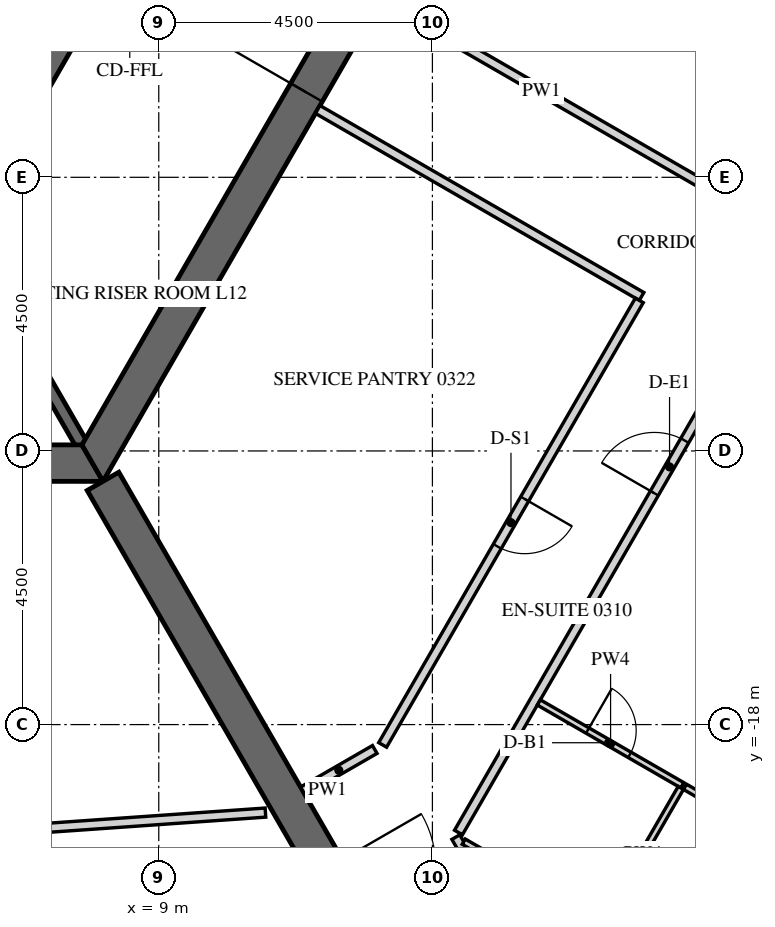
"""IFC4 building model, lengths in metres.
Left out: names, types, materials, properties, quantities, classifications, styles, units other than length and angle.
Written with IfcOpenShell. Run it as: python <this file> out.ifc"""

import sys

from ifc_helpers import new_model, si_unit, direction, frame, frame_2d, origin, place, context, subcontext, project, spatial, polyline, rectangle, outline, extrude, element, fill, save


model = new_model("IFC4")
c1 = context("Model", 3, precision=1e-05, world=origin(), true_north=direction((0.0, 1.0)))
c2 = subcontext(c1, "Body", "Model", "MODEL_VIEW")
j1 = project(units=[si_unit("LENGTHUNIT", "METRE"), si_unit("PLANEANGLEUNIT", "RADIAN")], contexts=[c1])
p1 = place(None, origin())
s1 = spatial("IfcSite", under=j1, at=p1, CompositionType="ELEMENT")
p2 = place(p1, origin())
s2 = spatial("IfcBuilding", under=s1, at=p2, CompositionType="ELEMENT")
p3 = place(p2, frame((0.0, 0.0, 60.9)))
s3 = spatial("IfcBuildingStorey", under=s2, at=p3, CompositionType="ELEMENT", Elevation=60.9)
p4 = place(p3, frame((-7.91, -13.7, -0.15), z_axis=(0.0, 0.0, 1.0), x_axis=(1.0, 0.0, 0.0)))
e1 = element("IfcWall", 1, at=p4, inside=s3, PredefinedType="SHEAR", context=c2, shape_type="SweptSolid", body=[
    extrude(outline(polyline([(-0.173, -0.3), (15.993, -0.3), (15.646, 0.3), (0.173, 0.3), (-0.173, -0.3)])), origin(), (0.0, 0.0, 1.0), 3.9),
])
p5 = place(p4, frame((7.31, 0.0, 0.15)))
e2 = element("IfcOpeningElement", 2, at=p5, cuts=e1, PredefinedType="OPENING", context=c2, shape_type="SweptSolid", body=[
    extrude(rectangle(XDim=1.2, YDim=2.4, at=frame_2d((0.6, 1.2))), frame((0.0, 0.31, 0.0), z_axis=(0.0, -1.0, 0.0), x_axis=(1.0, 0.0, 0.0)), (0.0, 0.0, 1.0), 0.62),
])
p6 = place(p3, frame((7.91, -13.7, -0.15), z_axis=(0.0, 0.0, 1.0), x_axis=(0.499999880136, 0.866025472988, 0.0)))
e3 = element("IfcWall", 3, at=p6, inside=s3, PredefinedType="SHEAR", context=c2, shape_type="SweptSolid", body=[
    extrude(outline(polyline([(-0.173, -0.3), (15.993, -0.3), (15.646, 0.3), (0.173, 0.3), (-0.173, -0.3)])), origin(), (0.0, 0.0, 1.0), 3.9),
])
p7 = place(p6, frame((7.039, 0.0, 0.15)))
e4 = element("IfcOpeningElement", 4, at=p7, cuts=e3, PredefinedType="OPENING", context=c2, shape_type="SweptSolid", body=[
    extrude(rectangle(XDim=1.8, YDim=2.4, at=frame_2d((0.9, 1.2))), frame((0.0, 0.31, 0.0), z_axis=(0.0, -1.0, 0.0), x_axis=(1.0, 0.0, 0.0)), (0.0, 0.0, 1.0), 0.62),
])
p8 = place(p3, frame((8.083, -14.0, -0.15), z_axis=(0.0, 0.0, 1.0), x_axis=(0.499997680643, -0.866026742862, 0.0)))
e5 = element("IfcWall", 5, at=p8, inside=s3, PredefinedType="SHEAR", context=c2, shape_type="SweptSolid", body=[
    extrude(rectangle(XDim=16.509, YDim=0.6, at=frame_2d((8.254, 0.0))), origin(), (0.0, 0.0, 1.0), 3.9),
])
p9 = place(p8, frame((7.354, 0.0, 0.15)))
e6 = element("IfcOpeningElement", 6, at=p9, cuts=e5, PredefinedType="OPENING", context=c2, shape_type="SweptSolid", body=[
    extrude(rectangle(XDim=1.8, YDim=2.4, at=frame_2d((0.9, 1.2))), frame((0.0, 0.31, 0.0), z_axis=(0.0, -1.0, 0.0), x_axis=(1.0, 0.0, 0.0)), (0.0, 0.0, 1.0), 0.62),
])
p10 = place(p3, frame((5.673, -9.825, -0.15), z_axis=(0.0, 0.0, 1.0), x_axis=(0.499995046907, 0.866028263435, 0.0)))
e7 = element("IfcWall", 7, at=p10, inside=s3, PredefinedType="SHEAR", context=c2, shape_type="SweptSolid", body=[
    extrude(outline(polyline([(-0.101, -0.175), (11.446, -0.175), (11.244, 0.175), (0.101, 0.175), (-0.101, -0.175)])), origin(), (0.0, 0.0, 1.0), 3.9),
])
p11 = place(p10, frame((4.801, 0.0, 0.15)))
e8 = element("IfcOpeningElement", 8, at=p11, cuts=e7, PredefinedType="OPENING", context=c2, shape_type="SweptSolid", body=[
    extrude(rectangle(XDim=1.8, YDim=2.4, at=frame_2d((0.9, 1.2))), frame((0.0, 0.185, 0.0), z_axis=(0.0, -1.0, 0.0), x_axis=(1.0, 0.0, 0.0)), (0.0, 0.0, 1.0), 0.37),
])
p12 = place(p3, frame((5.773, -10.0, -0.15), z_axis=(0.0, 0.0, 1.0), x_axis=(0.500038251005, -0.86600331843, 0.0)))
e9 = element("IfcWall", 9, at=p12, inside=s3, PredefinedType="SHEAR", context=c2, shape_type="SweptSolid", body=[
    extrude(rectangle(XDim=3.926, YDim=0.2, at=frame_2d((1.963, 0.0))), origin(), (0.0, 0.0, 1.0), 3.9),
])
p13 = place(p3, frame((10.754, -19.447, 0.0), z_axis=(0.0, 0.0, 1.0), x_axis=(-0.997564830966, -0.069745308232, 0.0)))
e10 = element("IfcWall", 10, at=p13, inside=s3, PredefinedType="PARTITIONING", context=c2, shape_type="SweptSolid", body=[
    extrude(rectangle(XDim=10.029, YDim=0.15, at=frame_2d((5.014, 0.0))), origin(), (0.0, 0.0, 1.0), 2.988),
])
p14 = place(p13, frame((4.564, 0.0, 0.0)))
e11 = element("IfcOpeningElement", 11, at=p14, cuts=e10, PredefinedType="OPENING", context=c2, shape_type="SweptSolid", body=[
    extrude(rectangle(XDim=0.9, YDim=2.1, at=frame_2d((0.45, 1.05))), frame((0.0, 0.085, 0.0), z_axis=(0.0, -1.0, 0.0), x_axis=(1.0, 0.0, 0.0)), (0.0, 0.0, 1.0), 0.17),
])
p15 = place(p3, frame((15.441, -22.545, 0.0), z_axis=(0.0, 0.0, 1.0), x_axis=(-0.500037089193, 0.86600398927, 0.0)))
e12 = element("IfcWall", 12, at=p15, inside=s3, PredefinedType="PARTITIONING", context=c2, shape_type="SweptSolid", body=[
    extrude(rectangle(XDim=3.112, YDim=0.15, at=frame_2d((1.556, 0.0))), origin(), (0.0, 0.0, 1.0), 2.988),
])
p16 = place(p3, frame((13.928, -19.775, 0.0), z_axis=(0.0, 0.0, 1.0), x_axis=(0.50000450071, 0.866022805283, 0.0)))
e13 = element("IfcWall", 13, at=p16, inside=s3, PredefinedType="PARTITIONING", context=c2, shape_type="SweptSolid", body=[
    extrude(rectangle(XDim=23.877, YDim=0.15, at=frame_2d((11.938, 0.0))), origin(), (0.0, 0.0, 1.0), 2.988),
])
p17 = place(p16, frame((6.443, 0.0, 0.0)))
e14 = element("IfcOpeningElement", 14, at=p17, cuts=e13, PredefinedType="OPENING", context=c2, shape_type="SweptSolid", body=[
    extrude(rectangle(XDim=1.0, YDim=2.1, at=frame_2d((0.5, 1.05))), frame((0.0, 0.085, 0.0), z_axis=(0.0, -1.0, 0.0), x_axis=(1.0, 0.0, 0.0)), (0.0, 0.0, 1.0), 0.17),
])
p18 = place(p16, frame((14.972, 0.0, 0.0)))
e15 = element("IfcOpeningElement", 15, at=p18, cuts=e13, PredefinedType="OPENING", context=c2, shape_type="SweptSolid", body=[
    extrude(rectangle(XDim=1.0, YDim=2.1, at=frame_2d((0.5, 1.05))), frame((0.0, 0.085, 0.0), z_axis=(0.0, -1.0, 0.0), x_axis=(1.0, 0.0, 0.0)), (0.0, 0.0, 1.0), 0.17),
])
p19 = place(p3, frame((17.925, -9.103, 0.0), z_axis=(0.0, 0.0, 1.0), x_axis=(-0.866013586754, 0.500020467139, 0.0)))
e16 = element("IfcWall", 16, at=p19, inside=s3, PredefinedType="PARTITIONING", context=c2, shape_type="SweptSolid", body=[
    extrude(rectangle(XDim=6.075, YDim=0.15, at=frame_2d((3.038, 0.0))), origin(), (0.0, 0.0, 1.0), 2.988),
])
p20 = place(p3, frame((11.614, -7.884, 0.0), z_axis=(0.0, 0.0, 1.0), x_axis=(0.866033542371, -0.499985903289, 0.0)))
e17 = element("IfcWall", 17, at=p20, inside=s3, PredefinedType="PARTITIONING", context=c2, shape_type="SweptSolid", body=[
    extrude(rectangle(XDim=6.15, YDim=0.15, at=frame_2d((3.075, 0.0))), origin(), (0.0, 0.0, 1.0), 2.988),
])
p21 = place(p3, frame((16.902, -11.024, 0.0), z_axis=(0.0, 0.0, 1.0), x_axis=(-0.499999527968, -0.866025676312, 0.0)))
e18 = element("IfcWall", 18, at=p21, inside=s3, PredefinedType="PARTITIONING", context=c2, shape_type="SweptSolid", body=[
    extrude(rectangle(XDim=8.441, YDim=0.15, at=frame_2d((4.22, 0.0))), origin(), (0.0, 0.0, 1.0), 2.988),
])
p22 = place(p21, frame((3.771, 0.0, 0.0)))
e19 = element("IfcOpeningElement", 19, at=p22, cuts=e18, PredefinedType="OPENING", context=c2, shape_type="SweptSolid", body=[
    extrude(rectangle(XDim=0.9, YDim=2.1, at=frame_2d((0.45, 1.05))), frame((0.0, 0.085, 0.0), z_axis=(0.0, -1.0, 0.0), x_axis=(1.0, 0.0, 0.0)), (0.0, 0.0, 1.0), 0.17),
])
p23 = place(p3, frame((12.552, -18.409, 0.0), z_axis=(0.0, 0.0, 1.0), x_axis=(-0.866078408764, -0.499908181442, 0.0)))
e20 = element("IfcWall", 20, at=p23, inside=s3, PredefinedType="PARTITIONING", context=c2, shape_type="SweptSolid", body=[
    extrude(rectangle(XDim=1.365, YDim=0.15, at=frame_2d((0.683, 0.0))), origin(), (0.0, 0.0, 1.0), 2.988),
])
p24 = place(p3, frame((16.31, -21.25, 0.0), z_axis=(0.0, 0.0, 1.0), x_axis=(-0.866029095148, 0.499993606316, 0.0)))
e21 = element("IfcWall", 21, at=p24, inside=s3, PredefinedType="PARTITIONING", context=c2, shape_type="SweptSolid", body=[
    extrude(rectangle(XDim=2.65, YDim=0.1, at=frame_2d((1.325, 0.0))), origin(), (0.0, 0.0, 1.0), 2.988),
])
p25 = place(p3, frame((15.25, -17.636, 0.0), z_axis=(0.0, 0.0, 1.0), x_axis=(0.866012511928, -0.500022328685, 0.0)))
e22 = element("IfcWall", 22, at=p25, inside=s3, PredefinedType="PARTITIONING", context=c2, shape_type="SweptSolid", body=[
    extrude(rectangle(XDim=2.725, YDim=0.1, at=frame_2d((1.363, 0.0))), origin(), (0.0, 0.0, 1.0), 2.988),
])
p26 = place(p25, frame((0.925, 0.0, 0.0)))
e23 = element("IfcOpeningElement", 23, at=p26, cuts=e22, PredefinedType="OPENING", context=c2, shape_type="SweptSolid", body=[
    extrude(rectangle(XDim=0.8, YDim=2.1, at=frame_2d((0.4, 1.05))), frame((0.0, 0.06, 0.0), z_axis=(0.0, -1.0, 0.0), x_axis=(1.0, 0.0, 0.0)), (0.0, 0.0, 1.0), 0.12),
])
p27 = place(p3, frame((17.654, -19.023, 0.0), z_axis=(0.0, 0.0, 1.0), x_axis=(0.866002029911, -0.500040482552, 0.0)))
e24 = element("IfcWall", 24, at=p27, inside=s3, PredefinedType="PARTITIONING", context=c2, shape_type="SweptSolid", body=[
    extrude(rectangle(XDim=1.75, YDim=0.1, at=frame_2d((0.875, 0.0))), origin(), (0.0, 0.0, 1.0), 2.988),
])
p28 = place(p27, frame((0.4, 0.0, 0.0)))
e25 = element("IfcOpeningElement", 25, at=p28, cuts=e24, PredefinedType="OPENING", context=c2, shape_type="SweptSolid", body=[
    extrude(rectangle(XDim=0.9, YDim=2.1, at=frame_2d((0.45, 1.05))), frame((0.0, 0.06, 0.0), z_axis=(0.0, -1.0, 0.0), x_axis=(1.0, 0.0, 0.0)), (0.0, 0.0, 1.0), 0.12),
])
p29 = place(p3, frame((19.144, -19.942, 0.0), z_axis=(0.0, 0.0, 1.0), x_axis=(-0.500062241894, -0.865989465428, 0.0)))
e26 = element("IfcWall", 26, at=p29, inside=s3, PredefinedType="PARTITIONING", context=c2, shape_type="SweptSolid", body=[
    extrude(rectangle(XDim=2.55, YDim=0.1, at=frame_2d((1.275, 0.0))), origin(), (0.0, 0.0, 1.0), 2.988),
])
p30 = place(p3, frame((16.335, -21.207, 0.0), z_axis=(0.0, 0.0, 1.0), x_axis=(0.500004234368, 0.866022959057, 0.0)))
e27 = element("IfcWall", 27, at=p30, inside=s3, PredefinedType="PARTITIONING", context=c2, shape_type="SweptSolid", body=[
    extrude(rectangle(XDim=2.5, YDim=0.1, at=frame_2d((1.25, 0.0))), origin(), (0.0, 0.0, 1.0), 2.988),
])
p31 = place(p7, origin())
e28 = element("IfcDoor", 28, at=p31, inside=s3, OperationType="DOUBLE_DOOR_SINGLE_SWING", PredefinedType="DOOR", context=c2, shape_type="SweptSolid", body=[
    extrude(rectangle(XDim=1.8, YDim=2.4, at=frame_2d((0.9, 1.2))), frame((0.0, 0.025, 0.0), z_axis=(0.0, -1.0, 0.0), x_axis=(1.0, 0.0, 0.0)), (0.0, 0.0, 1.0), 0.05),
])
fill(e4, e28)
p32 = place(p17, origin())
e29 = element("IfcDoor", 29, at=p32, inside=s3, OperationType="SINGLE_SWING_RIGHT", PredefinedType="DOOR", context=c2, shape_type="SweptSolid", body=[
    extrude(rectangle(XDim=1.0, YDim=2.1, at=frame_2d((0.5, 1.05))), frame((0.0, 0.025, 0.0), z_axis=(0.0, -1.0, 0.0), x_axis=(1.0, 0.0, 0.0)), (0.0, 0.0, 1.0), 0.05),
])
fill(e14, e29)
p33 = place(p26, origin())
e30 = element("IfcDoor", 30, at=p33, inside=s3, OperationType="SINGLE_SWING_RIGHT", PredefinedType="DOOR", context=c2, shape_type="SweptSolid", body=[
    extrude(rectangle(XDim=0.8, YDim=2.1, at=frame_2d((0.4, 1.05))), frame((0.0, 0.025, 0.0), z_axis=(0.0, -1.0, 0.0), x_axis=(1.0, 0.0, 0.0)), (0.0, 0.0, 1.0), 0.05),
])
fill(e23, e30)
p34 = place(p22, origin())
e31 = element("IfcDoor", 31, at=p34, inside=s3, OperationType="SINGLE_SWING_RIGHT", PredefinedType="DOOR", context=c2, shape_type="SweptSolid", body=[
    extrude(rectangle(XDim=0.9, YDim=2.1, at=frame_2d((0.45, 1.05))), frame((0.0, 0.025, 0.0), z_axis=(0.0, -1.0, 0.0), x_axis=(1.0, 0.0, 0.0)), (0.0, 0.0, 1.0), 0.05),
])
fill(e19, e31)
save(model, sys.argv[1])
